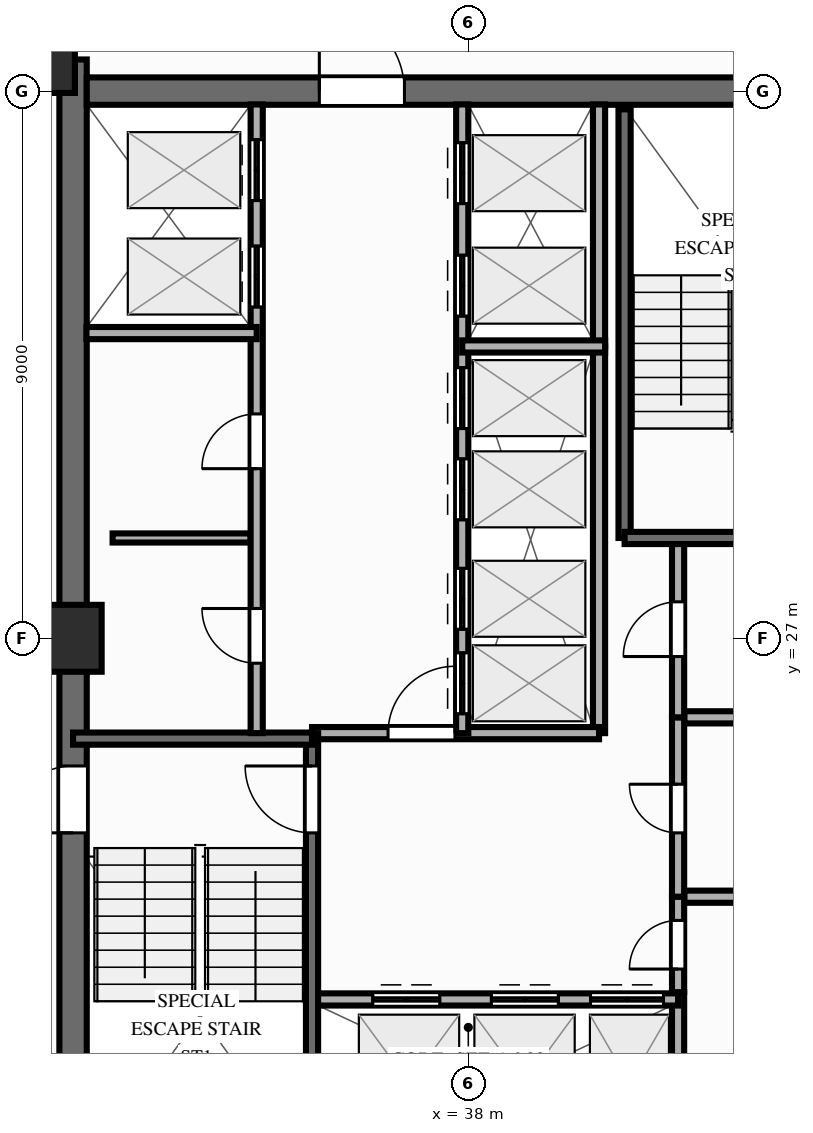
"""IFC4 building model, lengths in metres.
Left out: names, types, materials, properties, quantities, classifications, styles, units other than length and angle.
Written with IfcOpenShell. Run it as: python <this file> out.ifc"""

import sys

from ifc_helpers import new_model, si_unit, direction, frame, frame_2d, origin, origin_2d, place, context, subcontext, project, spatial, rectangle, extrude, source, transform, mapped, element, fill, save


model = new_model("IFC4")
c1 = context("Model", 3, precision=1e-05, world=origin(), true_north=direction((0.0, 1.0)))
c2 = subcontext(c1, "Body", "Model", "MODEL_VIEW")
j1 = project(units=[si_unit("LENGTHUNIT", "METRE"), si_unit("PLANEANGLEUNIT", "RADIAN")], contexts=[c1])
p1 = place(None, origin())
s1 = spatial("IfcSite", under=j1, at=p1, CompositionType="ELEMENT")
p2 = place(p1, origin())
s2 = spatial("IfcBuilding", under=s1, at=p2, CompositionType="ELEMENT")
p3 = place(p2, frame((0.0, 0.0, 148.7)))
s3 = spatial("IfcBuildingStorey", under=s2, at=p3, CompositionType="ELEMENT", Elevation=148.7)
p4 = place(p3, frame((31.5, 17.48, 0.0), z_axis=(0.0, 0.0, 1.0), x_axis=(0.0, 1.0, 0.0)))
e1 = element("IfcWall", 1, at=p4, inside=s3, PredefinedType="SHEAR", context=c2, shape_type="SweptSolid", body=[
    extrude(rectangle(XDim=19.04, YDim=0.45, at=frame_2d((9.52, 0.0))), origin(), (0.0, 0.0, 1.0), 3.5),
])
p5 = place(p4, frame((6.32, 0.0, 0.0)))
e2 = element("IfcOpeningElement", 2, at=p5, cuts=e1, PredefinedType="OPENING", context=c2, shape_type="SweptSolid", body=[
    extrude(rectangle(XDim=1.1, YDim=2.15, at=frame_2d((0.55, 1.075))), frame((0.0, 0.237, 0.0), z_axis=(0.0, -1.0, 0.0), x_axis=(1.0, 0.0, 0.0)), (0.0, 0.0, 1.0), 0.474),
])
p6 = place(p3, frame((31.725, 36.0, 0.0), z_axis=(0.0, 0.0, 1.0), x_axis=(1.0, 0.0, 0.0)))
e3 = element("IfcWall", 3, at=p6, inside=s3, PredefinedType="SHEAR", context=c2, shape_type="SweptSolid", body=[
    extrude(rectangle(XDim=12.55, YDim=0.45, at=frame_2d((6.275, 0.0))), origin(), (0.0, 0.0, 1.0), 3.5),
])
p7 = place(p6, frame((5.225, 0.0, 0.0), z_axis=(0.0, 0.0, 1.0), x_axis=(-1.0, 0.0, 0.0)))
e4 = element("IfcOpeningElement", 4, at=p7, cuts=e3, PredefinedType="OPENING", context=c2, shape_type="SweptSolid", body=[
    extrude(rectangle(XDim=1.4, YDim=2.15, at=frame_2d((0.7, 1.075))), frame((0.0, 0.237, 0.0), z_axis=(0.0, -1.0, 0.0), x_axis=(1.0, 0.0, 0.0)), (0.0, 0.0, 1.0), 0.474),
])
m1 = source(origin(), c2, "Body", "SweptSolid", [
    extrude(rectangle(XDim=1.1, YDim=1.1, at=origin_2d()), origin(), (0.0, 0.0, 1.0), 3.5),
])
for number, where, z_axis, x_axis in (
    (5, (30.98, 36.52, 0.0), (0.0, 0.0, 1.0), (1.0, 0.0, 0.0)),
    (6, (31.42, 27.0, 0.0), (0.0, 0.0, 1.0), (1.0, 0.0, 0.0)),
):
    element("IfcColumn", number, at=place(p3, frame(where, z_axis=z_axis, x_axis=x_axis)), inside=s3, PredefinedType="COLUMN", context=c2, shape_type="MappedRepresentation", body=[
        mapped(m1, transform((0.0, 0.0, 0.0), scale=1.0)),
    ])
p8 = place(p3, frame((32.15, 28.65, 0.0), z_axis=(0.0, 0.0, 1.0), x_axis=(1.0, 0.0, 0.0)))
e7 = element("IfcWall", 7, at=p8, inside=s3, PredefinedType="PARTITIONING", context=c2, shape_type="SweptSolid", body=[
    extrude(rectangle(XDim=2.27, YDim=0.15, at=frame_2d((1.135, 0.0))), origin(), (0.0, 0.0, 1.0), 2.64),
])
p9 = place(p3, frame((41.55, 22.75, 0.0), z_axis=(0.0, 0.0, 1.0), x_axis=(1.0, 0.0, 0.0)))
e8 = element("IfcWall", 8, at=p9, inside=s3, PredefinedType="PARTITIONING", context=c2, shape_type="SweptSolid", body=[
    extrude(rectangle(XDim=2.67, YDim=0.2, at=frame_2d((1.335, 0.0))), origin(), (0.0, 0.0, 1.0), 3.16),
])
p10 = place(p3, frame((41.55, 25.7, 0.0), z_axis=(0.0, 0.0, 1.0), x_axis=(1.0, 0.0, 0.0)))
e9 = element("IfcWall", 9, at=p10, inside=s3, PredefinedType="PARTITIONING", context=c2, shape_type="SweptSolid", body=[
    extrude(rectangle(XDim=2.67, YDim=0.2, at=frame_2d((1.335, 0.0))), origin(), (0.0, 0.0, 1.0), 2.64),
])
p11 = place(p3, frame((41.45, 18.22, 0.0), z_axis=(0.0, 0.0, 1.0), x_axis=(0.0, 1.0, 0.0)))
e10 = element("IfcWall", 10, at=p11, inside=s3, PredefinedType="PARTITIONING", context=c2, shape_type="SweptSolid", body=[
    extrude(rectangle(XDim=2.96, YDim=0.2, at=frame_2d((1.48, 0.0))), origin(), (0.0, 0.0, 1.0), 3.16),
])
p12 = place(p3, frame((41.45, 21.18, 0.0), z_axis=(0.0, 0.0, 1.0), x_axis=(0.0, 1.0, 0.0)))
e11 = element("IfcWall", 11, at=p12, inside=s3, PredefinedType="PARTITIONING", context=c2, shape_type="SweptSolid", body=[
    extrude(rectangle(XDim=1.57, YDim=0.2, at=frame_2d((0.785, 0.0))), origin(), (0.0, 0.0, 1.0), 3.16),
])
p13 = place(p12, frame((0.38, 0.0, 0.0)))
e12 = element("IfcOpeningElement", 12, at=p13, cuts=e11, PredefinedType="OPENING", context=c2, shape_type="SweptSolid", body=[
    extrude(rectangle(XDim=0.8, YDim=2.05, at=frame_2d((0.4, 1.025))), frame((0.0, 0.112, 0.0), z_axis=(0.0, -1.0, 0.0), x_axis=(1.0, 0.0, 0.0)), (0.0, 0.0, 1.0), 0.224),
])
p14 = place(p3, frame((41.45, 22.75, 0.0), z_axis=(0.0, 0.0, 1.0), x_axis=(0.0, 1.0, 0.0)))
e13 = element("IfcWall", 13, at=p14, inside=s3, PredefinedType="PARTITIONING", context=c2, shape_type="SweptSolid", body=[
    extrude(rectangle(XDim=2.95, YDim=0.2, at=frame_2d((1.475, 0.0))), origin(), (0.0, 0.0, 1.0), 3.16),
])
p15 = place(p14, frame((1.05, 0.0, 0.0)))
e14 = element("IfcOpeningElement", 14, at=p15, cuts=e13, PredefinedType="OPENING", context=c2, shape_type="SweptSolid", body=[
    extrude(rectangle(XDim=0.8, YDim=2.05, at=frame_2d((0.4, 1.025))), frame((0.0, 0.112, 0.0), z_axis=(0.0, -1.0, 0.0), x_axis=(1.0, 0.0, 0.0)), (0.0, 0.0, 1.0), 0.224),
])
p16 = place(p3, frame((41.45, 25.7, 0.0), z_axis=(0.0, 0.0, 1.0), x_axis=(0.0, 1.0, 0.0)))
e15 = element("IfcWall", 15, at=p16, inside=s3, PredefinedType="PARTITIONING", context=c2, shape_type="SweptSolid", body=[
    extrude(rectangle(XDim=2.9, YDim=0.2, at=frame_2d((1.45, 0.0))), origin(), (0.0, 0.0, 1.0), 3.16),
])
p17 = place(p16, frame((1.0, 0.0, 0.0)))
e16 = element("IfcOpeningElement", 16, at=p17, cuts=e15, PredefinedType="OPENING", context=c2, shape_type="SweptSolid", body=[
    extrude(rectangle(XDim=0.9, YDim=2.1, at=frame_2d((0.45, 1.05))), frame((0.0, 0.112, 0.0), z_axis=(0.0, -1.0, 0.0), x_axis=(1.0, 0.0, 0.0)), (0.0, 0.0, 1.0), 0.224),
])
p18 = place(p3, frame((40.15, 25.44, 0.0), z_axis=(0.0, 0.0, 1.0), x_axis=(0.0, 1.0, 0.0)))
e17 = element("IfcWall", 17, at=p18, inside=s3, PredefinedType="PARTITIONING", context=c2, shape_type="SweptSolid", body=[
    extrude(rectangle(XDim=6.36, YDim=0.2, at=frame_2d((3.18, 0.0))), origin(), (0.0, 0.0, 1.0), 3.16),
])
p19 = place(p3, frame((40.15, 31.8, 0.0), z_axis=(0.0, 0.0, 1.0), x_axis=(0.0, 1.0, 0.0)))
e18 = element("IfcWall", 18, at=p19, inside=s3, PredefinedType="PARTITIONING", context=c2, shape_type="SweptSolid", body=[
    extrude(rectangle(XDim=3.98, YDim=0.2, at=frame_2d((1.99, 0.0))), origin(), (0.0, 0.0, 1.0), 3.16),
])
p20 = place(p3, frame((35.43, 21.06, 0.0), z_axis=(0.0, 0.0, 1.0), x_axis=(1.0, 0.0, 0.0)))
e19 = element("IfcWall", 19, at=p20, inside=s3, PredefinedType="PARTITIONING", context=c2, shape_type="SweptSolid", body=[
    extrude(rectangle(XDim=6.02, YDim=0.2, at=frame_2d((3.01, 0.0))), origin(), (0.0, 0.0, 1.0), 3.16),
])
p21 = place(p20, frame((1.0, 0.0, 0.0)))
e20 = element("IfcOpeningElement", 20, at=p21, cuts=e19, PredefinedType="OPENING", context=c2, shape_type="SweptSolid", body=[
    extrude(rectangle(XDim=1.1, YDim=2.15, at=frame_2d((0.55, 1.075))), frame((0.0, 0.112, 0.0), z_axis=(0.0, -1.0, 0.0), x_axis=(1.0, 0.0, 0.0)), (0.0, 0.0, 1.0), 0.224),
])
p22 = place(p20, frame((2.95, 0.0, 0.0)))
e21 = element("IfcOpeningElement", 21, at=p22, cuts=e19, PredefinedType="OPENING", context=c2, shape_type="SweptSolid", body=[
    extrude(rectangle(XDim=1.1, YDim=2.15, at=frame_2d((0.55, 1.075))), frame((0.0, 0.112, 0.0), z_axis=(0.0, -1.0, 0.0), x_axis=(1.0, 0.0, 0.0)), (0.0, 0.0, 1.0), 0.224),
])
p23 = place(p20, frame((4.58, 0.0, 0.0)))
e22 = element("IfcOpeningElement", 22, at=p23, cuts=e19, PredefinedType="OPENING", context=c2, shape_type="SweptSolid", body=[
    extrude(rectangle(XDim=1.2, YDim=2.15, at=frame_2d((0.6, 1.075))), frame((0.0, 0.112, 0.0), z_axis=(0.0, -1.0, 0.0), x_axis=(1.0, 0.0, 0.0)), (0.0, 0.0, 1.0), 0.224),
])
p24 = place(p3, frame((35.43, 25.44, 0.0), z_axis=(0.0, 0.0, 1.0), x_axis=(1.0, 0.0, 0.0)))
e23 = element("IfcWall", 23, at=p24, inside=s3, PredefinedType="PARTITIONING", context=c2, shape_type="SweptSolid", body=[
    extrude(rectangle(XDim=4.72, YDim=0.2, at=frame_2d((2.36, 0.0))), origin(), (0.0, 0.0, 1.0), 3.16),
])
p25 = place(p24, frame((1.25, 0.0, 0.0)))
e24 = element("IfcOpeningElement", 24, at=p25, cuts=e23, PredefinedType="OPENING", context=c2, shape_type="SweptSolid", body=[
    extrude(rectangle(XDim=1.1, YDim=2.15, at=frame_2d((0.55, 1.075))), frame((0.0, 0.112, 0.0), z_axis=(0.0, -1.0, 0.0), x_axis=(1.0, 0.0, 0.0)), (0.0, 0.0, 1.0), 0.224),
])
p26 = place(p3, frame((35.43, 18.22, 0.0), z_axis=(0.0, 0.0, 1.0), x_axis=(0.0, 1.0, 0.0)))
e25 = element("IfcWall", 25, at=p26, inside=s3, PredefinedType="SOLIDWALL", context=c2, shape_type="SweptSolid", body=[
    extrude(rectangle(XDim=7.22, YDim=0.2, at=frame_2d((3.61, 0.0))), origin(), (0.0, 0.0, 1.0), 3.29),
])
p27 = place(p26, frame((6.68, 0.0, 0.0), z_axis=(0.0, 0.0, 1.0), x_axis=(-1.0, 0.0, 0.0)))
e26 = element("IfcOpeningElement", 26, at=p27, cuts=e25, PredefinedType="OPENING", context=c2, shape_type="SweptSolid", body=[
    extrude(rectangle(XDim=1.1, YDim=2.15, at=frame_2d((0.55, 1.075))), frame((0.0, 0.112, 0.0), z_axis=(0.0, -1.0, 0.0), x_axis=(1.0, 0.0, 0.0)), (0.0, 0.0, 1.0), 0.224),
])
p28 = place(p3, frame((31.5, 25.35, 0.0), z_axis=(0.0, 0.0, 1.0), x_axis=(1.0, 0.0, 0.0)))
e27 = element("IfcWall", 27, at=p28, inside=s3, PredefinedType="SOLIDWALL", context=c2, shape_type="SweptSolid", body=[
    extrude(rectangle(XDim=3.93, YDim=0.2, at=frame_2d((1.965, 0.0))), origin(), (0.0, 0.0, 1.0), 3.29),
])
p29 = place(p3, frame((40.57, 28.65, 0.0), z_axis=(0.0, 0.0, 1.0), x_axis=(0.0, 1.0, 0.0)))
e28 = element("IfcWall", 28, at=p29, inside=s3, PredefinedType="SOLIDWALL", context=c2, shape_type="SweptSolid", body=[
    extrude(rectangle(XDim=7.05, YDim=0.2, at=frame_2d((3.525, 0.0))), origin(), (0.0, 0.0, 1.0), 3.29),
])
p30 = place(p3, frame((40.57, 28.65, 0.0), z_axis=(0.0, 0.0, 1.0), x_axis=(1.0, 0.0, 0.0)))
e29 = element("IfcWall", 29, at=p30, inside=s3, PredefinedType="SOLIDWALL", context=c2, shape_type="SweptSolid", body=[
    extrude(rectangle(XDim=3.93, YDim=0.2, at=frame_2d((1.965, 0.0))), origin(), (0.0, 0.0, 1.0), 3.29),
])
p31 = place(p3, frame((34.52, 25.44, 0.0), z_axis=(0.0, 0.0, 1.0), x_axis=(0.0, 1.0, 0.0)))
e30 = element("IfcWall", 30, at=p31, inside=s3, PredefinedType="PARTITIONING", context=c2, shape_type="SweptSolid", body=[
    extrude(rectangle(XDim=10.34, YDim=0.2, at=frame_2d((5.17, 0.0))), origin(), (0.0, 0.0, 1.0), 3.16),
])
p32 = place(p31, frame((1.15, 0.0, 0.0)))
e31 = element("IfcOpeningElement", 31, at=p32, cuts=e30, PredefinedType="OPENING", context=c2, shape_type="SweptSolid", body=[
    extrude(rectangle(XDim=0.9, YDim=2.1, at=frame_2d((0.45, 1.05))), frame((0.0, 0.112, 0.0), z_axis=(0.0, -1.0, 0.0), x_axis=(1.0, 0.0, 0.0)), (0.0, 0.0, 1.0), 0.224),
])
p33 = place(p31, frame((4.35, 0.0, 0.0)))
e32 = element("IfcOpeningElement", 32, at=p33, cuts=e30, PredefinedType="OPENING", context=c2, shape_type="SweptSolid", body=[
    extrude(rectangle(XDim=0.9, YDim=2.1, at=frame_2d((0.45, 1.05))), frame((0.0, 0.112, 0.0), z_axis=(0.0, -1.0, 0.0), x_axis=(1.0, 0.0, 0.0)), (0.0, 0.0, 1.0), 0.224),
])
p34 = place(p31, frame((7.01, 0.0, 0.0)))
e33 = element("IfcOpeningElement", 33, at=p34, cuts=e30, PredefinedType="OPENING", context=c2, shape_type="SweptSolid", body=[
    extrude(rectangle(XDim=1.0, YDim=2.15, at=frame_2d((0.5, 1.075))), frame((0.0, 0.112, 0.0), z_axis=(0.0, -1.0, 0.0), x_axis=(1.0, 0.0, 0.0)), (0.0, 0.0, 1.0), 0.224),
])
p35 = place(p31, frame((8.76, 0.0, 0.0)))
e34 = element("IfcOpeningElement", 34, at=p35, cuts=e30, PredefinedType="OPENING", context=c2, shape_type="SweptSolid", body=[
    extrude(rectangle(XDim=1.0, YDim=2.15, at=frame_2d((0.5, 1.075))), frame((0.0, 0.112, 0.0), z_axis=(0.0, -1.0, 0.0), x_axis=(1.0, 0.0, 0.0)), (0.0, 0.0, 1.0), 0.224),
])
p36 = place(p3, frame((31.72, 32.02, 0.0), z_axis=(0.0, 0.0, 1.0), x_axis=(1.0, 0.0, 0.0)))
e35 = element("IfcWall", 35, at=p36, inside=s3, PredefinedType="PARTITIONING", context=c2, shape_type="SweptSolid", body=[
    extrude(rectangle(XDim=2.8, YDim=0.2, at=frame_2d((1.4, 0.0))), origin(), (0.0, 0.0, 1.0), 3.16),
])
p37 = place(p3, frame((37.9, 25.44, 0.0), z_axis=(0.0, 0.0, 1.0), x_axis=(0.0, 1.0, 0.0)))
e36 = element("IfcWall", 36, at=p37, inside=s3, PredefinedType="PARTITIONING", context=c2, shape_type="SweptSolid", body=[
    extrude(rectangle(XDim=10.34, YDim=0.2, at=frame_2d((5.17, 0.0))), origin(), (0.0, 0.0, 1.0), 3.16),
])
p38 = place(p37, frame((0.32, 0.0, 0.0)))
e37 = element("IfcOpeningElement", 37, at=p38, cuts=e36, PredefinedType="OPENING", context=c2, shape_type="SweptSolid", body=[
    extrude(rectangle(XDim=1.0, YDim=2.15, at=frame_2d((0.5, 1.075))), frame((0.0, 0.112, 0.0), z_axis=(0.0, -1.0, 0.0), x_axis=(1.0, 0.0, 0.0)), (0.0, 0.0, 1.0), 0.224),
])
p39 = place(p37, frame((1.71, 0.0, 0.0)))
e38 = element("IfcOpeningElement", 38, at=p39, cuts=e36, PredefinedType="OPENING", context=c2, shape_type="SweptSolid", body=[
    extrude(rectangle(XDim=1.0, YDim=2.15, at=frame_2d((0.5, 1.075))), frame((0.0, 0.112, 0.0), z_axis=(0.0, -1.0, 0.0), x_axis=(1.0, 0.0, 0.0)), (0.0, 0.0, 1.0), 0.224),
])
p40 = place(p37, frame((3.51, 0.0, 0.0)))
e39 = element("IfcOpeningElement", 39, at=p40, cuts=e36, PredefinedType="OPENING", context=c2, shape_type="SweptSolid", body=[
    extrude(rectangle(XDim=1.0, YDim=2.15, at=frame_2d((0.5, 1.075))), frame((0.0, 0.112, 0.0), z_axis=(0.0, -1.0, 0.0), x_axis=(1.0, 0.0, 0.0)), (0.0, 0.0, 1.0), 0.224),
])
p41 = place(p37, frame((5.01, 0.0, 0.0)))
e40 = element("IfcOpeningElement", 40, at=p41, cuts=e36, PredefinedType="OPENING", context=c2, shape_type="SweptSolid", body=[
    extrude(rectangle(XDim=1.0, YDim=2.15, at=frame_2d((0.5, 1.075))), frame((0.0, 0.112, 0.0), z_axis=(0.0, -1.0, 0.0), x_axis=(1.0, 0.0, 0.0)), (0.0, 0.0, 1.0), 0.224),
])
p42 = place(p37, frame((6.86, 0.0, 0.0)))
e41 = element("IfcOpeningElement", 41, at=p42, cuts=e36, PredefinedType="OPENING", context=c2, shape_type="SweptSolid", body=[
    extrude(rectangle(XDim=1.0, YDim=2.15, at=frame_2d((0.5, 1.075))), frame((0.0, 0.112, 0.0), z_axis=(0.0, -1.0, 0.0), x_axis=(1.0, 0.0, 0.0)), (0.0, 0.0, 1.0), 0.224),
])
p43 = place(p37, frame((8.71, 0.0, 0.0)))
e42 = element("IfcOpeningElement", 42, at=p43, cuts=e36, PredefinedType="OPENING", context=c2, shape_type="SweptSolid", body=[
    extrude(rectangle(XDim=1.0, YDim=2.15, at=frame_2d((0.5, 1.075))), frame((0.0, 0.112, 0.0), z_axis=(0.0, -1.0, 0.0), x_axis=(1.0, 0.0, 0.0)), (0.0, 0.0, 1.0), 0.224),
])
p44 = place(p3, frame((37.9, 31.8, 0.0), z_axis=(0.0, 0.0, 1.0), x_axis=(1.0, 0.0, 0.0)))
e43 = element("IfcWall", 43, at=p44, inside=s3, PredefinedType="PARTITIONING", context=c2, shape_type="SweptSolid", body=[
    extrude(rectangle(XDim=2.35, YDim=0.2, at=frame_2d((1.175, 0.0))), origin(), (0.0, 0.0, 1.0), 3.16),
])
m2 = source(origin(), c2, "Body", "SweptSolid", [
    extrude(rectangle(XDim=1.1, YDim=2.15, at=frame_2d((0.55, 1.075))), frame((0.0, 0.025, 0.0), z_axis=(0.0, -1.0, 0.0), x_axis=(1.0, 0.0, 0.0)), (0.0, 0.0, 1.0), 0.05),
])
p45 = place(p5, origin())
e44 = element("IfcDoor", 44, at=p45, inside=s3, OperationType="SINGLE_SWING_LEFT", PredefinedType="DOOR", context=c2, shape_type="MappedRepresentation", body=[
    mapped(m2, transform((0.0, 0.0, 0.0), scale=1.0)),
])
fill(e2, e44)
m3 = source(origin(), c2, "Body", "SweptSolid", [
    extrude(rectangle(XDim=1.4, YDim=2.15, at=frame_2d((0.7, 1.075))), frame((0.0, 0.025, 0.0), z_axis=(0.0, -1.0, 0.0), x_axis=(1.0, 0.0, 0.0)), (0.0, 0.0, 1.0), 0.05),
])
p46 = place(p7, origin())
e45 = element("IfcDoor", 45, at=p46, inside=s3, OperationType="SINGLE_SWING_RIGHT", PredefinedType="DOOR", context=c2, shape_type="MappedRepresentation", body=[
    mapped(m3, transform((0.0, 0.0, 0.0), scale=1.0)),
])
fill(e4, e45)
m4 = source(origin(), c2, "Body", "SweptSolid", [
    extrude(rectangle(XDim=0.8, YDim=2.05, at=frame_2d((0.4, 1.025))), frame((0.0, 0.025, 0.0), z_axis=(0.0, -1.0, 0.0), x_axis=(1.0, 0.0, 0.0)), (0.0, 0.0, 1.0), 0.05),
])
p47 = place(p13, origin())
e46 = element("IfcDoor", 46, at=p47, inside=s3, OperationType="SINGLE_SWING_LEFT", PredefinedType="DOOR", context=c2, shape_type="MappedRepresentation", body=[
    mapped(m4, transform((0.0, 0.0, 0.0), scale=1.0)),
])
fill(e12, e46)
p48 = place(p15, origin())
e47 = element("IfcDoor", 47, at=p48, inside=s3, OperationType="SINGLE_SWING_RIGHT", PredefinedType="DOOR", context=c2, shape_type="MappedRepresentation", body=[
    mapped(m4, transform((0.0, 0.0, 0.0), scale=1.0)),
])
fill(e14, e47)
m5 = source(origin(), c2, "Body", "SweptSolid", [
    extrude(rectangle(XDim=0.9, YDim=2.1, at=frame_2d((0.45, 1.05))), frame((0.0, 0.025, 0.0), z_axis=(0.0, -1.0, 0.0), x_axis=(1.0, 0.0, 0.0)), (0.0, 0.0, 1.0), 0.05),
])
p49 = place(p17, origin())
e48 = element("IfcDoor", 48, at=p49, inside=s3, OperationType="SINGLE_SWING_LEFT", PredefinedType="DOOR", context=c2, shape_type="MappedRepresentation", body=[
    mapped(m5, transform((0.0, 0.0, 0.0), scale=1.0)),
])
fill(e16, e48)
p50 = place(p21, origin())
e49 = element("IfcDoor", 49, at=p50, inside=s3, OperationType="DOUBLE_DOOR_SLIDING", PredefinedType="DOOR", context=c2, shape_type="MappedRepresentation", body=[
    mapped(m2, transform((0.0, 0.0, 0.0), scale=1.0)),
])
fill(e20, e49)
p51 = place(p22, origin())
e50 = element("IfcDoor", 50, at=p51, inside=s3, OperationType="DOUBLE_DOOR_SLIDING", PredefinedType="DOOR", context=c2, shape_type="MappedRepresentation", body=[
    mapped(m2, transform((0.0, 0.0, 0.0), scale=1.0)),
])
fill(e21, e50)
m6 = source(origin(), c2, "Body", "SweptSolid", [
    extrude(rectangle(XDim=1.2, YDim=2.15, at=frame_2d((0.6, 1.075))), frame((0.0, 0.025, 0.0), z_axis=(0.0, -1.0, 0.0), x_axis=(1.0, 0.0, 0.0)), (0.0, 0.0, 1.0), 0.05),
])
p52 = place(p23, origin())
e51 = element("IfcDoor", 51, at=p52, inside=s3, OperationType="DOUBLE_DOOR_SLIDING", PredefinedType="DOOR", context=c2, shape_type="MappedRepresentation", body=[
    mapped(m6, transform((0.0, 0.0, 0.0), scale=1.0)),
])
fill(e22, e51)
p53 = place(p25, origin())
e52 = element("IfcDoor", 52, at=p53, inside=s3, OperationType="SINGLE_SWING_RIGHT", PredefinedType="DOOR", context=c2, shape_type="MappedRepresentation", body=[
    mapped(m2, transform((0.0, 0.0, 0.0), scale=1.0)),
])
fill(e24, e52)
p54 = place(p27, origin())
e53 = element("IfcDoor", 53, at=p54, inside=s3, OperationType="SINGLE_SWING_LEFT", PredefinedType="DOOR", context=c2, shape_type="MappedRepresentation", body=[
    mapped(m2, transform((0.0, 0.0, 0.0), scale=1.0)),
])
fill(e26, e53)
p55 = place(p32, origin())
e54 = element("IfcDoor", 54, at=p55, inside=s3, OperationType="SINGLE_SWING_RIGHT", PredefinedType="DOOR", context=c2, shape_type="MappedRepresentation", body=[
    mapped(m5, transform((0.0, 0.0, 0.0), scale=1.0)),
])
fill(e31, e54)
p56 = place(p33, origin())
e55 = element("IfcDoor", 55, at=p56, inside=s3, OperationType="SINGLE_SWING_LEFT", PredefinedType="DOOR", context=c2, shape_type="MappedRepresentation", body=[
    mapped(m5, transform((0.0, 0.0, 0.0), scale=1.0)),
])
fill(e32, e55)
m7 = source(origin(), c2, "Body", "SweptSolid", [
    extrude(rectangle(XDim=1.0, YDim=2.15, at=frame_2d((0.5, 1.075))), frame((0.0, 0.025, 0.0), z_axis=(0.0, -1.0, 0.0), x_axis=(1.0, 0.0, 0.0)), (0.0, 0.0, 1.0), 0.05),
])
p57 = place(p34, origin())
e56 = element("IfcDoor", 56, at=p57, inside=s3, OperationType="DOUBLE_DOOR_SLIDING", PredefinedType="DOOR", context=c2, shape_type="MappedRepresentation", body=[
    mapped(m7, transform((0.0, 0.0, 0.0), scale=1.0)),
])
fill(e33, e56)
p58 = place(p35, origin())
e57 = element("IfcDoor", 57, at=p58, inside=s3, OperationType="DOUBLE_DOOR_SLIDING", PredefinedType="DOOR", context=c2, shape_type="MappedRepresentation", body=[
    mapped(m7, transform((0.0, 0.0, 0.0), scale=1.0)),
])
fill(e34, e57)
p59 = place(p38, origin())
e58 = element("IfcDoor", 58, at=p59, inside=s3, OperationType="DOUBLE_DOOR_SLIDING", PredefinedType="DOOR", context=c2, shape_type="MappedRepresentation", body=[
    mapped(m7, transform((0.0, 0.0, 0.0), scale=1.0)),
])
fill(e37, e58)
p60 = place(p39, origin())
e59 = element("IfcDoor", 59, at=p60, inside=s3, OperationType="DOUBLE_DOOR_SLIDING", PredefinedType="DOOR", context=c2, shape_type="MappedRepresentation", body=[
    mapped(m7, transform((0.0, 0.0, 0.0), scale=1.0)),
])
fill(e38, e59)
p61 = place(p40, origin())
e60 = element("IfcDoor", 60, at=p61, inside=s3, OperationType="DOUBLE_DOOR_SLIDING", PredefinedType="DOOR", context=c2, shape_type="MappedRepresentation", body=[
    mapped(m7, transform((0.0, 0.0, 0.0), scale=1.0)),
])
fill(e39, e60)
p62 = place(p41, origin())
e61 = element("IfcDoor", 61, at=p62, inside=s3, OperationType="DOUBLE_DOOR_SLIDING", PredefinedType="DOOR", context=c2, shape_type="MappedRepresentation", body=[
    mapped(m7, transform((0.0, 0.0, 0.0), scale=1.0)),
])
fill(e40, e61)
p63 = place(p42, origin())
e62 = element("IfcDoor", 62, at=p63, inside=s3, OperationType="DOUBLE_DOOR_SLIDING", PredefinedType="DOOR", context=c2, shape_type="MappedRepresentation", body=[
    mapped(m7, transform((0.0, 0.0, 0.0), scale=1.0)),
])
fill(e41, e62)
p64 = place(p43, origin())
e63 = element("IfcDoor", 63, at=p64, inside=s3, OperationType="DOUBLE_DOOR_SLIDING", PredefinedType="DOOR", context=c2, shape_type="MappedRepresentation", body=[
    mapped(m7, transform((0.0, 0.0, 0.0), scale=1.0)),
])
fill(e42, e63)
save(model, sys.argv[1])
